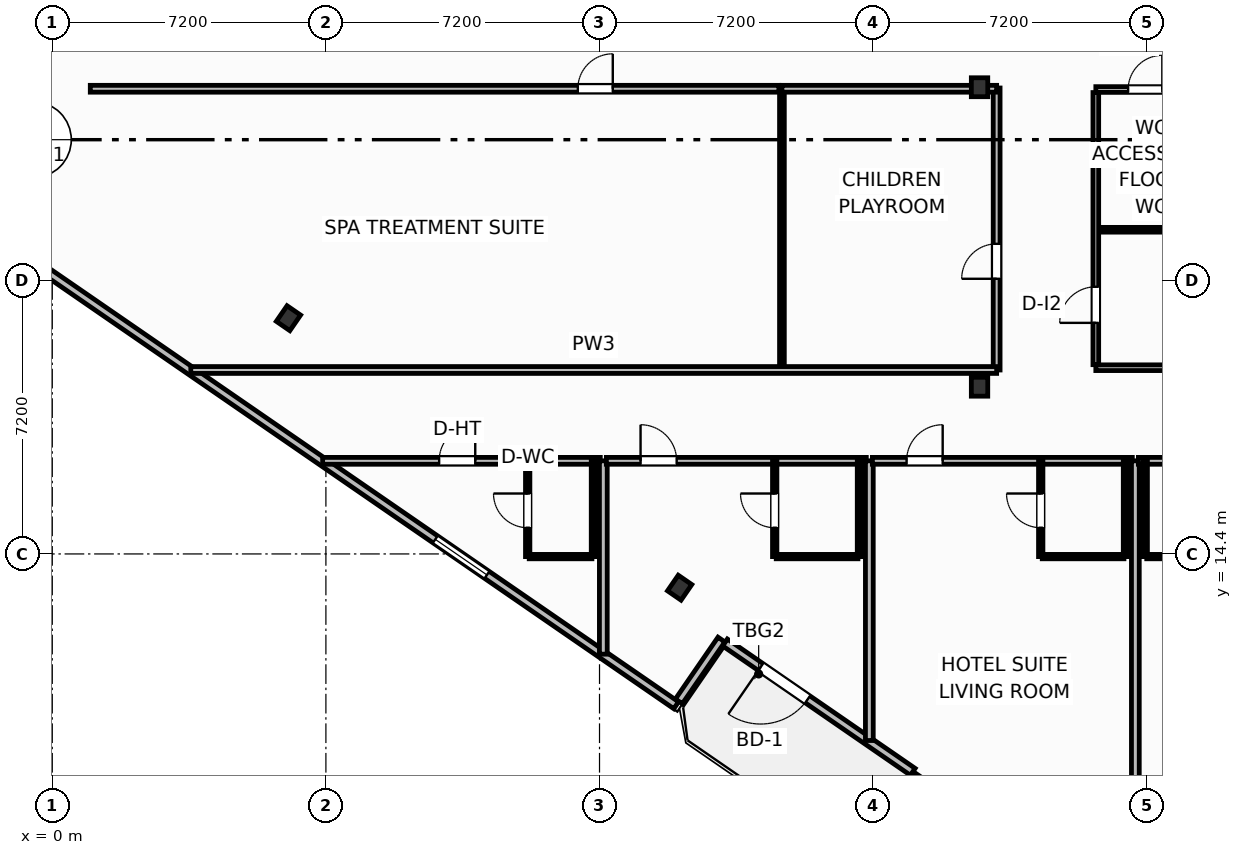
"""IFC4 building model, lengths in metres.
Left out: names, types, materials, properties, quantities, classifications, styles, units other than length and angle.
Written with IfcOpenShell. Run it as: python <this file> out.ifc"""

import sys

from ifc_helpers import new_model, si_unit, direction, frame, frame_2d, origin, origin_2d, place, context, subcontext, project, spatial, rectangle, i_section, extrude, element, fill, save


model = new_model("IFC4")
c1 = context("Model", 3, precision=1e-05, world=origin(), true_north=direction((0.0, 1.0)))
c2 = subcontext(c1, "Body", "Model", "MODEL_VIEW")
j1 = project(units=[si_unit("LENGTHUNIT", "METRE"), si_unit("PLANEANGLEUNIT", "RADIAN")], contexts=[c1])
p1 = place(None, origin())
s1 = spatial("IfcSite", under=j1, at=p1, CompositionType="ELEMENT")
p2 = place(p1, origin())
s2 = spatial("IfcBuilding", under=s1, at=p2, CompositionType="ELEMENT")
p3 = place(p2, frame((0.0, 0.0, 49.2)))
s3 = spatial("IfcBuildingStorey", under=s2, at=p3, CompositionType="ELEMENT", Elevation=49.2)
for number, where, z_axis, x_axis in (
    (1, (24.4, 18.8, 0.0), (0.0, 0.0, 1.0), (1.0, 0.0, 0.0)),
    (2, (24.4, 26.68, 0.0), (0.0, 0.0, 1.0), (1.0, 0.0, 0.0)),
    (3, (6.215, 20.603, 0.0), (0.0, 0.0, 1.0), (0.824, -0.567, 0.0)),
    (4, (16.509, 13.512, 0.0), (0.0, 0.0, 1.0), (0.824, -0.567, 0.0)),
):
    element("IfcColumn", number, at=place(p3, frame(where, z_axis=z_axis, x_axis=x_axis)), inside=s3, PredefinedType="COLUMN", context=c2, shape_type="SweptSolid", body=[
        extrude(i_section(OverallWidth=0.432, OverallDepth=0.498, WebThickness=0.056, FlangeThickness=0.089, FilletRadius=0.025, at=origin_2d()), origin(), (0.0, 0.0, 1.0), 3.7),
    ])
p4 = place(p3, frame((22.643, 8.667, 0.0), z_axis=(0.0, 0.0, 1.0), x_axis=(-0.823534636215, 0.567265989598, 0.0)))
e5 = element("IfcWall", 5, at=p4, inside=s3, PredefinedType="SOLIDWALL", context=c2, shape_type="SweptSolid", body=[
    extrude(rectangle(XDim=6.0, YDim=0.22, at=frame_2d((3.0, 0.0))), origin(), (0.0, 0.0, 1.0), 2.73),
])
p5 = place(p4, frame((3.36, 0.0, 0.0)))
e6 = element("IfcOpeningElement", 6, at=p5, cuts=e5, PredefinedType="OPENING", context=c2, shape_type="SweptSolid", body=[
    extrude(rectangle(XDim=1.5, YDim=2.25, at=frame_2d((0.75, 1.125))), frame((0.0, 0.12, 0.0), z_axis=(0.0, -1.0, 0.0), x_axis=(1.0, 0.0, 0.0)), (0.0, 0.0, 1.0), 0.24),
])
p6 = place(p3, frame((-2.728, 23.605, 0.0), z_axis=(0.0, 0.0, 1.0), x_axis=(0.823535075462, -0.567265351915, 0.0)))
e7 = element("IfcWall", 7, at=p6, inside=s3, PredefinedType="SOLIDWALL", context=c2, shape_type="SweptSolid", body=[
    extrude(rectangle(XDim=23.247, YDim=0.22, at=frame_2d((11.624, 0.0))), origin(), (0.0, 0.0, 1.0), 2.73),
])
p7 = place(p6, frame((15.55, 0.0, 0.8)))
e8 = element("IfcOpeningElement", 8, at=p7, cuts=e7, PredefinedType="OPENING", context=c2, shape_type="SweptSolid", body=[
    extrude(rectangle(XDim=1.65, YDim=1.65, at=frame_2d((0.825, 0.825))), frame((0.0, 0.12, 0.0), z_axis=(0.0, -1.0, 0.0), x_axis=(1.0, 0.0, 0.0)), (0.0, 0.0, 1.0), 0.24),
])
p8 = place(p3, frame((16.488, 10.521, 0.0), z_axis=(0.0, 0.0, 1.0), x_axis=(0.567131976434, 0.823626930902, 0.0)))
e9 = element("IfcWall", 9, at=p8, inside=s3, PredefinedType="SOLIDWALL", context=c2, shape_type="SweptSolid", body=[
    extrude(rectangle(XDim=1.975, YDim=0.22, at=frame_2d((0.988, 0.0))), origin(), (0.0, 0.0, 1.0), 2.73),
])
p9 = place(p3, frame((22.747, 8.607, 0.0), z_axis=(0.0, 0.0, 1.0), x_axis=(-0.567219383419, -0.823566737474, 0.0)))
e10 = element("IfcWall", 10, at=p9, inside=s3, PredefinedType="SOLIDWALL", context=c2, shape_type="SweptSolid", body=[
    extrude(rectangle(XDim=2.1, YDim=0.22, at=frame_2d((1.05, 0.0))), origin(), (0.0, 0.0, 1.0), 2.73),
])
p10 = place(p3, frame((7.115, 16.85, 0.0), z_axis=(0.0, 0.0, 1.0), x_axis=(1.0, 0.0, 0.0)))
e11 = element("IfcWall", 11, at=p10, inside=s3, PredefinedType="PARTITIONING", context=c2, shape_type="SweptSolid", body=[
    extrude(rectangle(XDim=7.305, YDim=0.18, at=frame_2d((3.653, 0.0))), origin(), (0.0, 0.0, 1.0), 3.45),
])
p11 = place(p10, frame((3.066, 0.0, 0.0)))
e12 = element("IfcOpeningElement", 12, at=p11, cuts=e11, PredefinedType="OPENING", context=c2, shape_type="SweptSolid", body=[
    extrude(rectangle(XDim=0.95, YDim=2.15, at=frame_2d((0.475, 1.075))), frame((0.0, 0.1, 0.0), z_axis=(0.0, -1.0, 0.0), x_axis=(1.0, 0.0, 0.0)), (0.0, 0.0, 1.0), 0.2),
])
p12 = place(p3, frame((12.55, 14.33, 0.0), z_axis=(0.0, 0.0, 1.0), x_axis=(1.0, 0.0, 0.0)))
e13 = element("IfcWall", 13, at=p12, inside=s3, PredefinedType="PARTITIONING", context=c2, shape_type="SweptSolid", body=[
    extrude(rectangle(XDim=1.65, YDim=0.115, at=frame_2d((0.825, 0.0))), origin(), (0.0, 0.0, 1.0), 3.45),
])
p13 = place(p3, frame((12.51, 14.33, 0.0), z_axis=(0.0, 0.0, 1.0), x_axis=(0.0, 1.0, 0.0)))
e14 = element("IfcWall", 14, at=p13, inside=s3, PredefinedType="PARTITIONING", context=c2, shape_type="SweptSolid", body=[
    extrude(rectangle(XDim=2.52, YDim=0.115, at=frame_2d((1.26, 0.0))), origin(), (0.0, 0.0, 1.0), 3.45),
])
p14 = place(p13, frame((0.76, 0.0, 0.0)))
e15 = element("IfcOpeningElement", 15, at=p14, cuts=e14, PredefinedType="OPENING", context=c2, shape_type="SweptSolid", body=[
    extrude(rectangle(XDim=0.9, YDim=2.05, at=frame_2d((0.45, 1.025))), frame((0.0, 0.067, 0.0), z_axis=(0.0, -1.0, 0.0), x_axis=(1.0, 0.0, 0.0)), (0.0, 0.0, 1.0), 0.135),
])
p15 = place(p3, frame((14.24, 14.33, 0.0), z_axis=(0.0, 0.0, 1.0), x_axis=(0.0, 1.0, 0.0)))
e16 = element("IfcWall", 16, at=p15, inside=s3, PredefinedType="PARTITIONING", context=c2, shape_type="SweptSolid", body=[
    extrude(rectangle(XDim=2.52, YDim=0.115, at=frame_2d((1.26, 0.0))), origin(), (0.0, 0.0, 1.0), 3.45),
])
p16 = place(p3, frame((14.5, 11.763, 0.0), z_axis=(0.0, 0.0, 1.0), x_axis=(0.0, 1.0, 0.0)))
e17 = element("IfcWall", 17, at=p16, inside=s3, PredefinedType="PARTITIONING", context=c2, shape_type="SweptSolid", body=[
    extrude(rectangle(XDim=5.087, YDim=0.205, at=frame_2d((2.544, 0.0))), origin(), (0.0, 0.0, 1.0), 3.45),
])
p17 = place(p3, frame((14.58, 16.85, 0.0), z_axis=(0.0, 0.0, 1.0), x_axis=(1.0, 0.0, 0.0)))
e18 = element("IfcWall", 18, at=p17, inside=s3, PredefinedType="PARTITIONING", context=c2, shape_type="SweptSolid", body=[
    extrude(rectangle(XDim=6.84, YDim=0.18, at=frame_2d((3.42, 0.0))), origin(), (0.0, 0.0, 1.0), 3.45),
])
p18 = place(p17, frame((0.9, 0.0, 0.0)))
e19 = element("IfcOpeningElement", 19, at=p18, cuts=e18, PredefinedType="OPENING", context=c2, shape_type="SweptSolid", body=[
    extrude(rectangle(XDim=0.95, YDim=2.15, at=frame_2d((0.475, 1.075))), frame((0.0, 0.1, 0.0), z_axis=(0.0, -1.0, 0.0), x_axis=(1.0, 0.0, 0.0)), (0.0, 0.0, 1.0), 0.2),
])
p19 = place(p3, frame((19.05, 14.33, 0.0), z_axis=(0.0, 0.0, 1.0), x_axis=(1.0, 0.0, 0.0)))
e20 = element("IfcWall", 20, at=p19, inside=s3, PredefinedType="PARTITIONING", context=c2, shape_type="SweptSolid", body=[
    extrude(rectangle(XDim=2.15, YDim=0.115, at=frame_2d((1.075, 0.0))), origin(), (0.0, 0.0, 1.0), 3.45),
])
p20 = place(p3, frame((19.01, 14.33, 0.0), z_axis=(0.0, 0.0, 1.0), x_axis=(0.0, 1.0, 0.0)))
e21 = element("IfcWall", 21, at=p20, inside=s3, PredefinedType="PARTITIONING", context=c2, shape_type="SweptSolid", body=[
    extrude(rectangle(XDim=2.52, YDim=0.115, at=frame_2d((1.26, 0.0))), origin(), (0.0, 0.0, 1.0), 3.45),
])
p21 = place(p20, frame((0.76, 0.0, 0.0)))
e22 = element("IfcOpeningElement", 22, at=p21, cuts=e21, PredefinedType="OPENING", context=c2, shape_type="SweptSolid", body=[
    extrude(rectangle(XDim=0.9, YDim=2.05, at=frame_2d((0.45, 1.025))), frame((0.0, 0.067, 0.0), z_axis=(0.0, -1.0, 0.0), x_axis=(1.0, 0.0, 0.0)), (0.0, 0.0, 1.0), 0.135),
])
p22 = place(p3, frame((21.24, 14.33, 0.0), z_axis=(0.0, 0.0, 1.0), x_axis=(0.0, 1.0, 0.0)))
e23 = element("IfcWall", 23, at=p22, inside=s3, PredefinedType="PARTITIONING", context=c2, shape_type="SweptSolid", body=[
    extrude(rectangle(XDim=2.52, YDim=0.115, at=frame_2d((1.26, 0.0))), origin(), (0.0, 0.0, 1.0), 3.45),
])
p23 = place(p3, frame((21.5, 9.491, 0.0), z_axis=(0.0, 0.0, 1.0), x_axis=(0.0, 1.0, 0.0)))
e24 = element("IfcWall", 24, at=p23, inside=s3, PredefinedType="PARTITIONING", context=c2, shape_type="SweptSolid", body=[
    extrude(rectangle(XDim=7.359, YDim=0.205, at=frame_2d((3.68, 0.0))), origin(), (0.0, 0.0, 1.0), 3.45),
])
p24 = place(p3, frame((21.58, 16.85, 0.0), z_axis=(0.0, 0.0, 1.0), x_axis=(1.0, 0.0, 0.0)))
e25 = element("IfcWall", 25, at=p24, inside=s3, PredefinedType="PARTITIONING", context=c2, shape_type="SweptSolid", body=[
    extrude(rectangle(XDim=6.84, YDim=0.18, at=frame_2d((3.42, 0.0))), origin(), (0.0, 0.0, 1.0), 3.45),
])
p25 = place(p24, frame((0.9, 0.0, 0.0)))
e26 = element("IfcOpeningElement", 26, at=p25, cuts=e25, PredefinedType="OPENING", context=c2, shape_type="SweptSolid", body=[
    extrude(rectangle(XDim=0.95, YDim=2.15, at=frame_2d((0.475, 1.075))), frame((0.0, 0.1, 0.0), z_axis=(0.0, -1.0, 0.0), x_axis=(1.0, 0.0, 0.0)), (0.0, 0.0, 1.0), 0.2),
])
p26 = place(p3, frame((26.05, 14.33, 0.0), z_axis=(0.0, 0.0, 1.0), x_axis=(1.0, 0.0, 0.0)))
e27 = element("IfcWall", 27, at=p26, inside=s3, PredefinedType="PARTITIONING", context=c2, shape_type="SweptSolid", body=[
    extrude(rectangle(XDim=2.15, YDim=0.115, at=frame_2d((1.075, 0.0))), origin(), (0.0, 0.0, 1.0), 3.45),
])
p27 = place(p3, frame((26.01, 14.33, 0.0), z_axis=(0.0, 0.0, 1.0), x_axis=(0.0, 1.0, 0.0)))
e28 = element("IfcWall", 28, at=p27, inside=s3, PredefinedType="PARTITIONING", context=c2, shape_type="SweptSolid", body=[
    extrude(rectangle(XDim=2.52, YDim=0.115, at=frame_2d((1.26, 0.0))), origin(), (0.0, 0.0, 1.0), 3.45),
])
p28 = place(p27, frame((0.76, 0.0, 0.0)))
e29 = element("IfcOpeningElement", 29, at=p28, cuts=e28, PredefinedType="OPENING", context=c2, shape_type="SweptSolid", body=[
    extrude(rectangle(XDim=0.9, YDim=2.05, at=frame_2d((0.45, 1.025))), frame((0.0, 0.067, 0.0), z_axis=(0.0, -1.0, 0.0), x_axis=(1.0, 0.0, 0.0)), (0.0, 0.0, 1.0), 0.135),
])
p29 = place(p3, frame((28.24, 14.33, 0.0), z_axis=(0.0, 0.0, 1.0), x_axis=(0.0, 1.0, 0.0)))
e30 = element("IfcWall", 30, at=p29, inside=s3, PredefinedType="PARTITIONING", context=c2, shape_type="SweptSolid", body=[
    extrude(rectangle(XDim=2.52, YDim=0.115, at=frame_2d((1.26, 0.0))), origin(), (0.0, 0.0, 1.0), 3.45),
])
p30 = place(p3, frame((28.5, 2.609, 0.0), z_axis=(0.0, 0.0, 1.0), x_axis=(0.0, 1.0, 0.0)))
e31 = element("IfcWall", 31, at=p30, inside=s3, PredefinedType="PARTITIONING", context=c2, shape_type="SweptSolid", body=[
    extrude(rectangle(XDim=14.241, YDim=0.205, at=frame_2d((7.121, 0.0))), origin(), (0.0, 0.0, 1.0), 3.45),
])
p31 = place(p3, frame((28.58, 16.85, 0.0), z_axis=(0.0, 0.0, 1.0), x_axis=(1.0, 0.0, 0.0)))
e32 = element("IfcWall", 32, at=p31, inside=s3, PredefinedType="PARTITIONING", context=c2, shape_type="SweptSolid", body=[
    extrude(rectangle(XDim=6.84, YDim=0.18, at=frame_2d((3.42, 0.0))), origin(), (0.0, 0.0, 1.0), 3.45),
])
p32 = place(p31, frame((3.29, 0.0, 0.0)))
e33 = element("IfcOpeningElement", 33, at=p32, cuts=e32, PredefinedType="OPENING", context=c2, shape_type="SweptSolid", body=[
    extrude(rectangle(XDim=0.95, YDim=2.15, at=frame_2d((0.475, 1.075))), frame((0.0, 0.1, 0.0), z_axis=(0.0, -1.0, 0.0), x_axis=(1.0, 0.0, 0.0)), (0.0, 0.0, 1.0), 0.2),
])
p33 = place(p3, frame((28.8, 14.33, 0.0), z_axis=(0.0, 0.0, 1.0), x_axis=(1.0, 0.0, 0.0)))
e34 = element("IfcWall", 34, at=p33, inside=s3, PredefinedType="PARTITIONING", context=c2, shape_type="SweptSolid", body=[
    extrude(rectangle(XDim=2.15, YDim=0.115, at=frame_2d((1.075, 0.0))), origin(), (0.0, 0.0, 1.0), 3.45),
])
p34 = place(p3, frame((28.76, 14.33, 0.0), z_axis=(0.0, 0.0, 1.0), x_axis=(0.0, 1.0, 0.0)))
e35 = element("IfcWall", 35, at=p34, inside=s3, PredefinedType="PARTITIONING", context=c2, shape_type="SweptSolid", body=[
    extrude(rectangle(XDim=2.52, YDim=0.115, at=frame_2d((1.26, 0.0))), origin(), (0.0, 0.0, 1.0), 3.45),
])
p35 = place(p3, frame((1.0, 26.64, 0.0), z_axis=(0.0, 0.0, 1.0), x_axis=(1.0, 0.0, 0.0)))
e36 = element("IfcWall", 36, at=p35, inside=s3, PredefinedType="PARTITIONING", context=c2, shape_type="SweptSolid", body=[
    extrude(rectangle(XDim=18.12, YDim=0.18, at=frame_2d((9.06, 0.0))), origin(), (0.0, 0.0, 1.0), 3.45),
])
p36 = place(p35, frame((12.829, 0.0, 0.0)))
e37 = element("IfcOpeningElement", 37, at=p36, cuts=e36, PredefinedType="OPENING", context=c2, shape_type="SweptSolid", body=[
    extrude(rectangle(XDim=0.92, YDim=2.05, at=frame_2d((0.46, 1.025))), frame((0.0, 0.1, 0.0), z_axis=(0.0, -1.0, 0.0), x_axis=(1.0, 0.0, 0.0)), (0.0, 0.0, 1.0), 0.2),
])
p37 = place(p3, frame((24.85, 19.24, 0.0), z_axis=(0.0, 0.0, 1.0), x_axis=(0.0, 1.0, 0.0)))
e38 = element("IfcWall", 38, at=p37, inside=s3, PredefinedType="PARTITIONING", context=c2, shape_type="SweptSolid", body=[
    extrude(rectangle(XDim=7.42, YDim=0.18, at=frame_2d((3.71, 0.0))), origin(), (0.0, 0.0, 1.0), 3.45),
])
p38 = place(p37, frame((2.4, 0.0, 0.0)))
e39 = element("IfcOpeningElement", 39, at=p38, cuts=e38, PredefinedType="OPENING", context=c2, shape_type="SweptSolid", body=[
    extrude(rectangle(XDim=0.92, YDim=2.05, at=frame_2d((0.46, 1.025))), frame((0.0, 0.1, 0.0), z_axis=(0.0, -1.0, 0.0), x_axis=(1.0, 0.0, 0.0)), (0.0, 0.0, 1.0), 0.2),
])
p39 = place(p3, frame((19.2, 19.24, 0.0), z_axis=(0.0, 0.0, 1.0), x_axis=(0.0, 1.0, 0.0)))
e40 = element("IfcWall", 40, at=p39, inside=s3, PredefinedType="PARTITIONING", context=c2, shape_type="SweptSolid", body=[
    extrude(rectangle(XDim=7.42, YDim=0.125, at=frame_2d((3.71, 0.0))), origin(), (0.0, 0.0, 1.0), 3.45),
])
p40 = place(p3, frame((3.645, 19.24, 0.0), z_axis=(0.0, 0.0, 1.0), x_axis=(1.0, 0.0, 0.0)))
e41 = element("IfcWall", 41, at=p40, inside=s3, PredefinedType="PARTITIONING", context=c2, shape_type="SweptSolid", body=[
    extrude(rectangle(XDim=21.205, YDim=0.18, at=frame_2d((10.603, 0.0))), origin(), (0.0, 0.0, 1.0), 2.58),
])
p41 = place(p3, frame((19.2, 26.64, 0.0), z_axis=(0.0, 0.0, 1.0), x_axis=(1.0, 0.0, 0.0)))
e42 = element("IfcWall", 42, at=p41, inside=s3, PredefinedType="PARTITIONING", context=c2, shape_type="SweptSolid", body=[
    extrude(rectangle(XDim=5.65, YDim=0.18, at=frame_2d((2.825, 0.0))), origin(), (0.0, 0.0, 1.0), 2.662),
])
p42 = place(p3, frame((27.46, 19.3, 0.0), z_axis=(0.0, 0.0, 1.0), x_axis=(1.0, 0.0, 0.0)))
e43 = element("IfcWall", 43, at=p42, inside=s3, PredefinedType="PARTITIONING", context=c2, shape_type="SweptSolid", body=[
    extrude(rectangle(XDim=6.1, YDim=0.15, at=frame_2d((3.05, 0.0))), origin(), (0.0, 0.0, 1.0), 2.662),
])
p43 = place(p3, frame((27.46, 26.62, 0.0), z_axis=(0.0, 0.0, 1.0), x_axis=(1.0, 0.0, 0.0)))
e44 = element("IfcWall", 44, at=p43, inside=s3, PredefinedType="PARTITIONING", context=c2, shape_type="SweptSolid", body=[
    extrude(rectangle(XDim=6.1, YDim=0.15, at=frame_2d((3.05, 0.0))), origin(), (0.0, 0.0, 1.0), 2.662),
])
p44 = place(p43, frame((0.85, 0.0, 0.0)))
e45 = element("IfcOpeningElement", 45, at=p44, cuts=e44, PredefinedType="OPENING", context=c2, shape_type="SweptSolid", body=[
    extrude(rectangle(XDim=0.9, YDim=2.05, at=frame_2d((0.45, 1.025))), frame((0.0, 0.085, 0.0), z_axis=(0.0, -1.0, 0.0), x_axis=(1.0, 0.0, 0.0)), (0.0, 0.0, 1.0), 0.17),
])
p45 = place(p43, frame((3.85, 0.0, 0.0)))
e46 = element("IfcOpeningElement", 46, at=p45, cuts=e44, PredefinedType="OPENING", context=c2, shape_type="SweptSolid", body=[
    extrude(rectangle(XDim=0.92, YDim=2.05, at=frame_2d((0.46, 1.025))), frame((0.0, 0.085, 0.0), z_axis=(0.0, -1.0, 0.0), x_axis=(1.0, 0.0, 0.0)), (0.0, 0.0, 1.0), 0.17),
])
p46 = place(p3, frame((27.52, 22.93, 0.0), z_axis=(0.0, 0.0, 1.0), x_axis=(1.0, 0.0, 0.0)))
e47 = element("IfcWall", 47, at=p46, inside=s3, PredefinedType="PARTITIONING", context=c2, shape_type="SweptSolid", body=[
    extrude(rectangle(XDim=6.0, YDim=0.125, at=frame_2d((3.0, 0.0))), origin(), (0.0, 0.0, 1.0), 3.45),
])
p47 = place(p3, frame((27.46, 19.38, 0.0), z_axis=(0.0, 0.0, 1.0), x_axis=(0.0, 1.0, 0.0)))
e48 = element("IfcWall", 48, at=p47, inside=s3, PredefinedType="PARTITIONING", context=c2, shape_type="SweptSolid", body=[
    extrude(rectangle(XDim=7.16, YDim=0.15, at=frame_2d((3.58, 0.0))), origin(), (0.0, 0.0, 1.0), 3.45),
])
p48 = place(p47, frame((1.1, 0.0, 0.0)))
e49 = element("IfcOpeningElement", 49, at=p48, cuts=e48, PredefinedType="OPENING", context=c2, shape_type="SweptSolid", body=[
    extrude(rectangle(XDim=0.95, YDim=2.05, at=frame_2d((0.475, 1.025))), frame((0.0, 0.085, 0.0), z_axis=(0.0, -1.0, 0.0), x_axis=(1.0, 0.0, 0.0)), (0.0, 0.0, 1.0), 0.17),
])
p49 = place(p5, origin())
e50 = element("IfcDoor", 50, at=p49, inside=s3, OperationType="SINGLE_SWING_RIGHT", PredefinedType="DOOR", context=c2, shape_type="SweptSolid", body=[
    extrude(rectangle(XDim=1.5, YDim=2.25, at=frame_2d((0.75, 1.125))), frame((0.0, 0.025, 0.0), z_axis=(0.0, -1.0, 0.0), x_axis=(1.0, 0.0, 0.0)), (0.0, 0.0, 1.0), 0.05),
])
fill(e6, e50)
p50 = place(p7, origin())
e51 = element("IfcWindow", 51, at=p50, inside=s3, PartitioningType="SINGLE_PANEL", PredefinedType="WINDOW", context=c2, shape_type="SweptSolid", body=[
    extrude(rectangle(XDim=1.65, YDim=1.65, at=frame_2d((0.825, 0.825))), frame((0.0, 0.03, 0.0), z_axis=(0.0, -1.0, 0.0), x_axis=(1.0, 0.0, 0.0)), (0.0, 0.0, 1.0), 0.06),
])
fill(e8, e51)
p51 = place(p11, origin())
e52 = element("IfcDoor", 52, at=p51, inside=s3, OperationType="SINGLE_SWING_RIGHT", PredefinedType="DOOR", context=c2, shape_type="SweptSolid", body=[
    extrude(rectangle(XDim=0.95, YDim=2.15, at=frame_2d((0.475, 1.075))), frame((0.0, 0.025, 0.0), z_axis=(0.0, -1.0, 0.0), x_axis=(1.0, 0.0, 0.0)), (0.0, 0.0, 1.0), 0.05),
])
fill(e12, e52)
p52 = place(p14, origin())
e53 = element("IfcDoor", 53, at=p52, inside=s3, OperationType="SINGLE_SWING_RIGHT", PredefinedType="DOOR", context=c2, shape_type="SweptSolid", body=[
    extrude(rectangle(XDim=0.9, YDim=2.05, at=frame_2d((0.45, 1.025))), frame((0.0, 0.025, 0.0), z_axis=(0.0, -1.0, 0.0), x_axis=(1.0, 0.0, 0.0)), (0.0, 0.0, 1.0), 0.05),
])
fill(e15, e53)
p53 = place(p18, origin())
e54 = element("IfcDoor", 54, at=p53, inside=s3, OperationType="SINGLE_SWING_LEFT", PredefinedType="DOOR", context=c2, shape_type="SweptSolid", body=[
    extrude(rectangle(XDim=0.95, YDim=2.15, at=frame_2d((0.475, 1.075))), frame((0.0, 0.025, 0.0), z_axis=(0.0, -1.0, 0.0), x_axis=(1.0, 0.0, 0.0)), (0.0, 0.0, 1.0), 0.05),
])
fill(e19, e54)
p54 = place(p21, origin())
e55 = element("IfcDoor", 55, at=p54, inside=s3, OperationType="SINGLE_SWING_RIGHT", PredefinedType="DOOR", context=c2, shape_type="SweptSolid", body=[
    extrude(rectangle(XDim=0.9, YDim=2.05, at=frame_2d((0.45, 1.025))), frame((0.0, 0.025, 0.0), z_axis=(0.0, -1.0, 0.0), x_axis=(1.0, 0.0, 0.0)), (0.0, 0.0, 1.0), 0.05),
])
fill(e22, e55)
p55 = place(p25, origin())
e56 = element("IfcDoor", 56, at=p55, inside=s3, OperationType="SINGLE_SWING_RIGHT", PredefinedType="DOOR", context=c2, shape_type="SweptSolid", body=[
    extrude(rectangle(XDim=0.95, YDim=2.15, at=frame_2d((0.475, 1.075))), frame((0.0, 0.025, 0.0), z_axis=(0.0, -1.0, 0.0), x_axis=(1.0, 0.0, 0.0)), (0.0, 0.0, 1.0), 0.05),
])
fill(e26, e56)
p56 = place(p28, origin())
e57 = element("IfcDoor", 57, at=p56, inside=s3, OperationType="SINGLE_SWING_RIGHT", PredefinedType="DOOR", context=c2, shape_type="SweptSolid", body=[
    extrude(rectangle(XDim=0.9, YDim=2.05, at=frame_2d((0.45, 1.025))), frame((0.0, 0.025, 0.0), z_axis=(0.0, -1.0, 0.0), x_axis=(1.0, 0.0, 0.0)), (0.0, 0.0, 1.0), 0.05),
])
fill(e29, e57)
p57 = place(p36, origin())
e58 = element("IfcDoor", 58, at=p57, inside=s3, OperationType="SINGLE_SWING_RIGHT", PredefinedType="DOOR", context=c2, shape_type="SweptSolid", body=[
    extrude(rectangle(XDim=0.92, YDim=2.05, at=frame_2d((0.46, 1.025))), frame((0.0, 0.025, 0.0), z_axis=(0.0, -1.0, 0.0), x_axis=(1.0, 0.0, 0.0)), (0.0, 0.0, 1.0), 0.05),
])
fill(e37, e58)
p58 = place(p38, origin())
e59 = element("IfcDoor", 59, at=p58, inside=s3, OperationType="SINGLE_SWING_LEFT", PredefinedType="DOOR", context=c2, shape_type="SweptSolid", body=[
    extrude(rectangle(XDim=0.92, YDim=2.05, at=frame_2d((0.46, 1.025))), frame((0.0, 0.025, 0.0), z_axis=(0.0, -1.0, 0.0), x_axis=(1.0, 0.0, 0.0)), (0.0, 0.0, 1.0), 0.05),
])
fill(e39, e59)
p59 = place(p44, origin())
e60 = element("IfcDoor", 60, at=p59, inside=s3, OperationType="SINGLE_SWING_RIGHT", PredefinedType="DOOR", context=c2, shape_type="SweptSolid", body=[
    extrude(rectangle(XDim=0.9, YDim=2.05, at=frame_2d((0.45, 1.025))), frame((0.0, 0.025, 0.0), z_axis=(0.0, -1.0, 0.0), x_axis=(1.0, 0.0, 0.0)), (0.0, 0.0, 1.0), 0.05),
])
fill(e45, e60)
p60 = place(p48, origin())
e61 = element("IfcDoor", 61, at=p60, inside=s3, OperationType="SINGLE_SWING_LEFT", PredefinedType="DOOR", context=c2, shape_type="SweptSolid", body=[
    extrude(rectangle(XDim=0.95, YDim=2.05, at=frame_2d((0.475, 1.025))), frame((0.0, 0.025, 0.0), z_axis=(0.0, -1.0, 0.0), x_axis=(1.0, 0.0, 0.0)), (0.0, 0.0, 1.0), 0.05),
])
fill(e49, e61)
save(model, sys.argv[1])
